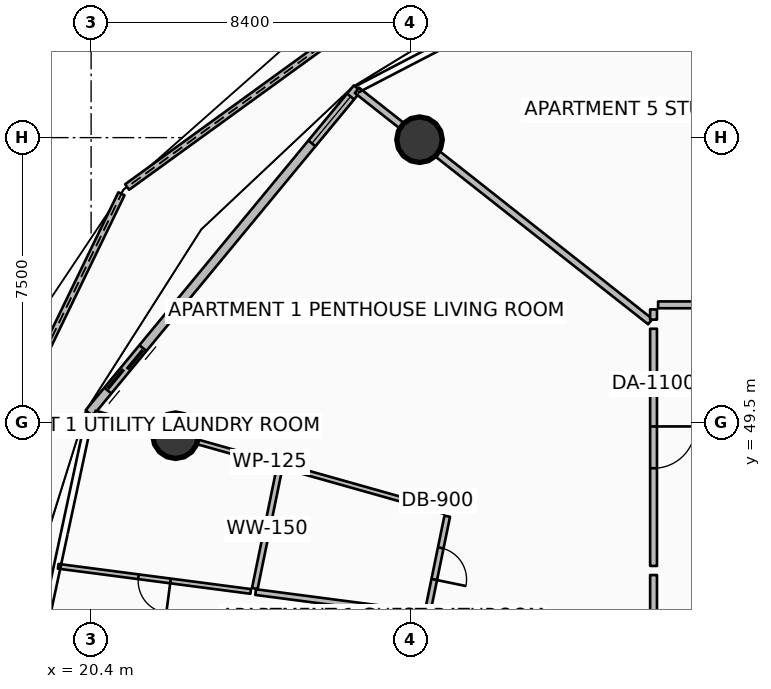
"""IFC4 building model, lengths in metres.
Left out: names, types, materials, properties, quantities, classifications, styles, units other than length and angle.
Written with IfcOpenShell. Run it as: python <this file> out.ifc"""

import sys

from ifc_helpers import new_model, si_unit, direction, frame, frame_2d, origin, origin_2d, place, context, subcontext, project, spatial, polyline, rectangle, circle, outline, extrude, element, fill, save


model = new_model("IFC4")
c1 = context("Model", 3, precision=1e-05, world=origin(), true_north=direction((0.0, 1.0)))
c2 = subcontext(c1, "Body", "Model", "MODEL_VIEW")
j1 = project(units=[si_unit("LENGTHUNIT", "METRE"), si_unit("PLANEANGLEUNIT", "RADIAN")], contexts=[c1])
p1 = place(None, origin())
s1 = spatial("IfcSite", under=j1, at=p1, CompositionType="ELEMENT")
p2 = place(p1, origin())
s2 = spatial("IfcBuilding", under=s1, at=p2, CompositionType="ELEMENT")
p3 = place(p2, frame((0.0, 0.0, 101.4)))
s3 = spatial("IfcBuildingStorey", under=s2, at=p3, CompositionType="ELEMENT", Elevation=101.4)
for number, where, z_axis, x_axis in (
    (1, (29.042, 56.945, 0.0), (0.0, 0.0, 1.0), (1.0, 0.0, 0.0)),
    (2, (22.623, 49.157, 0.0), (0.0, 0.0, 1.0), (1.0, 0.0, 0.0)),
):
    element("IfcColumn", number, at=place(p3, frame(where, z_axis=z_axis, x_axis=x_axis)), inside=s3, PredefinedType="COLUMN", context=c2, shape_type="SweptSolid", body=[
        extrude(circle(Radius=0.6, at=origin_2d()), origin(), (0.0, 0.0, 1.0), 3.5),
    ])
p4 = place(p3, frame((30.45, 62.296, 0.0), z_axis=(0.0, 0.0, 1.0), x_axis=(-0.809764200103, -0.58675543477, 0.0)))
e3 = element("IfcWall", 3, at=p4, inside=s3, PredefinedType="PARAPET", context=c2, shape_type="SweptSolid", body=[
    extrude(outline(polyline([(0.0, 0.0), (11.241, 0.0), (11.241, 1.632), (5.621, 1.418), (0.0, 1.233), (0.0, 0.0)])), frame((0.0, 0.09, 0.0), z_axis=(0.0, -1.0, 0.0), x_axis=(1.0, 0.0, 0.0)), (0.0, 0.0, 1.0), 0.18),
])
p5 = place(p3, frame((21.198, 55.521, 0.0), z_axis=(0.0, 0.0, 1.0), x_axis=(-0.436107839058, -0.89989441198, 0.0)))
e4 = element("IfcWall", 4, at=p5, inside=s3, PredefinedType="PARAPET", context=c2, shape_type="SweptSolid", body=[
    extrude(outline(polyline([(0.0, 0.0), (12.005, 0.0), (12.005, 1.86), (6.002, 1.798), (0.0, 1.632), (0.0, 0.0)])), frame((0.0, 0.09, 0.0), z_axis=(0.0, -1.0, 0.0), x_axis=(1.0, 0.0, 0.0)), (0.0, 0.0, 1.0), 0.18),
])
p6 = place(p3, frame((27.407, 58.298, 0.0), z_axis=(0.0, 0.0, 1.0), x_axis=(-0.636704975, -0.771107498868, 0.0)))
e5 = element("IfcWall", 5, at=p6, inside=s3, PredefinedType="SOLIDWALL", context=c2, shape_type="SweptSolid", body=[
    extrude(rectangle(XDim=11.084, YDim=0.24, at=frame_2d((5.542, 0.0))), origin(), (0.0, 0.0, 1.0), 2.45),
])
p7 = place(p6, frame((8.864, 0.0, 0.0)))
e6 = element("IfcOpeningElement", 6, at=p7, cuts=e5, PredefinedType="OPENING", context=c2, shape_type="SweptSolid", body=[
    extrude(rectangle(XDim=1.45, YDim=2.15, at=frame_2d((0.725, 1.075))), frame((0.0, 0.13, 0.0), z_axis=(0.0, -1.0, 0.0), x_axis=(1.0, 0.0, 0.0)), (0.0, 0.0, 1.0), 0.26),
])
p8 = place(p6, frame((0.28, 0.0, 0.65)))
e7 = element("IfcOpeningElement", 7, at=p8, cuts=e5, PredefinedType="OPENING", context=c2, shape_type="SweptSolid", body=[
    extrude(rectangle(XDim=1.6, YDim=1.5, at=frame_2d((0.8, 0.75))), frame((0.0, 0.13, 0.0), z_axis=(0.0, -1.0, 0.0), x_axis=(1.0, 0.0, 0.0)), (0.0, 0.0, 1.0), 0.26),
])
p9 = place(p3, frame((35.114, 52.159, 0.0), z_axis=(0.0, 0.0, 1.0), x_axis=(-0.785295873565, 0.619120659453, 0.0)))
e8 = element("IfcWall", 8, at=p9, inside=s3, PredefinedType="PARTITIONING", context=c2, shape_type="SweptSolid", body=[
    extrude(rectangle(XDim=9.829, YDim=0.18, at=frame_2d((4.915, 0.0))), origin(), (0.0, 0.0, 1.0), 2.94),
])
p10 = place(p3, frame((35.2, 51.971, 0.0), z_axis=(0.0, 0.0, 1.0), x_axis=(0.0, -1.0, 0.0)))
e9 = element("IfcWall", 9, at=p10, inside=s3, PredefinedType="PARTITIONING", context=c2, shape_type="SweptSolid", body=[
    extrude(rectangle(XDim=6.241, YDim=0.18, at=frame_2d((3.12, 0.0))), origin(), (0.0, 0.0, 1.0), 2.94),
])
p11 = place(p10, frame((2.57, 0.0, 0.0)))
e10 = element("IfcOpeningElement", 10, at=p11, cuts=e9, PredefinedType="OPENING", context=c2, shape_type="SweptSolid", body=[
    extrude(rectangle(XDim=1.1, YDim=2.1, at=frame_2d((0.55, 1.05))), frame((0.0, 0.1, 0.0), z_axis=(0.0, -1.0, 0.0), x_axis=(1.0, 0.0, 0.0)), (0.0, 0.0, 1.0), 0.2),
])
p12 = place(p3, frame((35.2, 45.49, 0.0), z_axis=(0.0, 0.0, 1.0), x_axis=(0.0, -1.0, 0.0)))
e11 = element("IfcWall", 11, at=p12, inside=s3, PredefinedType="PARTITIONING", context=c2, shape_type="SweptSolid", body=[
    extrude(rectangle(XDim=4.885, YDim=0.18, at=frame_2d((2.442, 0.0))), origin(), (0.0, 0.0, 1.0), 2.94),
])
p13 = place(p3, frame((29.695, 47.163, 0.0), z_axis=(0.0, 0.0, 1.0), x_axis=(-0.962455839824, 0.271438310467, 0.0)))
e12 = element("IfcWall", 12, at=p13, inside=s3, PredefinedType="PARTITIONING", context=c2, shape_type="SweptSolid", body=[
    extrude(rectangle(XDim=9.552, YDim=0.125, at=frame_2d((4.776, 0.0))), origin(), (0.0, 0.0, 1.0), 2.94),
])
p14 = place(p3, frame((29.771, 47.037, 0.0), z_axis=(0.0, 0.0, 1.0), x_axis=(-0.201031337284, -0.979584810739, 0.0)))
e13 = element("IfcWall", 13, at=p14, inside=s3, PredefinedType="PARTITIONING", context=c2, shape_type="SweptSolid", body=[
    extrude(rectangle(XDim=2.549, YDim=0.15, at=frame_2d((1.274, 0.0))), origin(), (0.0, 0.0, 1.0), 2.94),
])
p15 = place(p14, frame((0.85, 0.0, 0.0)))
e14 = element("IfcOpeningElement", 14, at=p15, cuts=e13, PredefinedType="OPENING", context=c2, shape_type="SweptSolid", body=[
    extrude(rectangle(XDim=0.85, YDim=2.06, at=frame_2d((0.425, 1.03))), frame((0.0, 0.085, 0.0), z_axis=(0.0, -1.0, 0.0), x_axis=(1.0, 0.0, 0.0)), (0.0, 0.0, 1.0), 0.17),
])
p16 = place(p3, frame((25.354, 48.283, 0.0), z_axis=(0.0, 0.0, 1.0), x_axis=(-0.201037617238, -0.979583521939, 0.0)))
e15 = element("IfcWall", 15, at=p16, inside=s3, PredefinedType="PARTITIONING", context=c2, shape_type="SweptSolid", body=[
    extrude(rectangle(XDim=3.213, YDim=0.15, at=frame_2d((1.607, 0.0))), origin(), (0.0, 0.0, 1.0), 2.94),
])
p17 = place(p3, frame((29.151, 44.464, 0.0), z_axis=(0.0, 0.0, 1.0), x_axis=(-0.991563130501, 0.129624682181, 0.0)))
e16 = element("IfcWall", 16, at=p17, inside=s3, PredefinedType="PARTITIONING", context=c2, shape_type="SweptSolid", body=[
    extrude(rectangle(XDim=4.46, YDim=0.15, at=frame_2d((2.23, 0.0))), origin(), (0.0, 0.0, 1.0), 2.94),
])
p18 = place(p3, frame((24.6, 45.059, 0.0), z_axis=(0.0, 0.0, 1.0), x_axis=(-0.991566000337, 0.129602727501, 0.0)))
e17 = element("IfcWall", 17, at=p18, inside=s3, PredefinedType="PARTITIONING", context=c2, shape_type="SweptSolid", body=[
    extrude(rectangle(XDim=5.109, YDim=0.125, at=frame_2d((2.554, 0.0))), origin(), (0.0, 0.0, 1.0), 2.94),
])
p19 = place(p18, frame((2.129, 0.0, 0.0)))
e18 = element("IfcOpeningElement", 18, at=p19, cuts=e17, PredefinedType="OPENING", context=c2, shape_type="SweptSolid", body=[
    extrude(rectangle(XDim=0.85, YDim=2.06, at=frame_2d((0.425, 1.03))), frame((0.0, 0.073, 0.0), z_axis=(0.0, -1.0, 0.0), x_axis=(1.0, 0.0, 0.0)), (0.0, 0.0, 1.0), 0.145),
])
p20 = place(p3, frame((41.944, 52.6, 0.0), z_axis=(0.0, 0.0, 1.0), x_axis=(-1.0, 0.0, 0.0)))
e19 = element("IfcWall", 19, at=p20, inside=s3, PredefinedType="PARTITIONING", context=c2, shape_type="SweptSolid", body=[
    extrude(rectangle(XDim=6.624, YDim=0.18, at=frame_2d((3.312, 0.0))), origin(), (0.0, 0.0, 1.0), 2.94),
])
p21 = place(p20, frame((2.762, 0.0, 0.0)))
e20 = element("IfcOpeningElement", 20, at=p21, cuts=e19, PredefinedType="OPENING", context=c2, shape_type="SweptSolid", body=[
    extrude(rectangle(XDim=1.1, YDim=2.1, at=frame_2d((0.55, 1.05))), frame((0.0, 0.1, 0.0), z_axis=(0.0, -1.0, 0.0), x_axis=(1.0, 0.0, 0.0)), (0.0, 0.0, 1.0), 0.2),
])
p22 = place(p3, frame((35.2, 52.48, 0.0), z_axis=(0.0, 0.0, 1.0), x_axis=(0.0, -1.0, 0.0)))
e21 = element("IfcWall", 21, at=p22, inside=s3, PredefinedType="PARTITIONING", context=c2, shape_type="SweptSolid", body=[
    extrude(rectangle(XDim=0.269, YDim=0.18, at=frame_2d((0.135, 0.0))), origin(), (0.0, 0.0, 1.0), 2.94),
])
p23 = place(p7, origin())
e22 = element("IfcDoor", 22, at=p23, inside=s3, OperationType="DOUBLE_DOOR_SLIDING", PredefinedType="DOOR", context=c2, shape_type="SweptSolid", body=[
    extrude(rectangle(XDim=1.45, YDim=2.15, at=frame_2d((0.725, 1.075))), frame((0.0, 0.025, 0.0), z_axis=(0.0, -1.0, 0.0), x_axis=(1.0, 0.0, 0.0)), (0.0, 0.0, 1.0), 0.05),
])
fill(e6, e22)
p24 = place(p8, origin())
e23 = element("IfcWindow", 23, at=p24, inside=s3, PartitioningType="SINGLE_PANEL", PredefinedType="WINDOW", context=c2, shape_type="SweptSolid", body=[
    extrude(rectangle(XDim=1.6, YDim=1.5, at=frame_2d((0.8, 0.75))), frame((0.0, 0.03, 0.0), z_axis=(0.0, -1.0, 0.0), x_axis=(1.0, 0.0, 0.0)), (0.0, 0.0, 1.0), 0.06),
])
fill(e7, e23)
p25 = place(p11, origin())
e24 = element("IfcDoor", 24, at=p25, inside=s3, OperationType="SINGLE_SWING_LEFT", PredefinedType="DOOR", context=c2, shape_type="SweptSolid", body=[
    extrude(rectangle(XDim=1.1, YDim=2.1, at=frame_2d((0.55, 1.05))), frame((0.0, 0.025, 0.0), z_axis=(0.0, -1.0, 0.0), x_axis=(1.0, 0.0, 0.0)), (0.0, 0.0, 1.0), 0.05),
])
fill(e10, e24)
p26 = place(p15, origin())
e25 = element("IfcDoor", 25, at=p26, inside=s3, OperationType="SINGLE_SWING_RIGHT", PredefinedType="DOOR", context=c2, shape_type="SweptSolid", body=[
    extrude(rectangle(XDim=0.85, YDim=2.06, at=frame_2d((0.425, 1.03))), frame((0.0, 0.025, 0.0), z_axis=(0.0, -1.0, 0.0), x_axis=(1.0, 0.0, 0.0)), (0.0, 0.0, 1.0), 0.05),
])
fill(e14, e25)
p27 = place(p19, origin())
e26 = element("IfcDoor", 26, at=p27, inside=s3, OperationType="SINGLE_SWING_LEFT", PredefinedType="DOOR", context=c2, shape_type="SweptSolid", body=[
    extrude(rectangle(XDim=0.85, YDim=2.06, at=frame_2d((0.425, 1.03))), frame((0.0, 0.025, 0.0), z_axis=(0.0, -1.0, 0.0), x_axis=(1.0, 0.0, 0.0)), (0.0, 0.0, 1.0), 0.05),
])
fill(e18, e26)
save(model, sys.argv[1])
